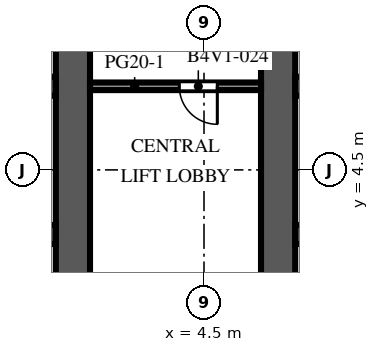
"""IFC4 building model, lengths in metres.
Left out: names, types, materials, properties, quantities, classifications, styles, units other than length and angle.
Written with IfcOpenShell. Run it as: python <this file> out.ifc"""

import sys

from ifc_helpers import new_model, si_unit, direction, frame, frame_2d, origin, place, context, subcontext, project, spatial, rectangle, extrude, element, fill, save


model = new_model("IFC4")
c1 = context("Model", 3, precision=1e-05, world=origin(), true_north=direction((0.0, 1.0)))
c2 = subcontext(c1, "Body", "Model", "MODEL_VIEW")
j1 = project(units=[si_unit("LENGTHUNIT", "METRE"), si_unit("PLANEANGLEUNIT", "RADIAN")], contexts=[c1])
p1 = place(None, origin())
s1 = spatial("IfcSite", under=j1, at=p1, CompositionType="ELEMENT")
p2 = place(p1, origin())
s2 = spatial("IfcBuilding", under=s1, at=p2, CompositionType="ELEMENT")
p3 = place(p2, frame((0.0, 0.0, 133.1)))
s3 = spatial("IfcBuildingStorey", under=s2, at=p3, CompositionType="ELEMENT", Elevation=133.1)
p4 = place(p3, frame((1.05, -9.0, 0.0), z_axis=(0.0, 0.0, 1.0), x_axis=(0.0, 1.0, 0.0)))
e1 = element("IfcWall", 1, at=p4, inside=s3, PredefinedType="SHEAR", context=c2, shape_type="SweptSolid", body=[
    extrude(rectangle(XDim=27.5, YDim=0.9, at=frame_2d((13.75, 0.0))), origin(), (0.0, 0.0, 1.0), 4.1),
])
p5 = place(p4, frame((12.55, 0.0, 0.0)))
e2 = element("IfcOpeningElement", 2, at=p5, cuts=e1, PredefinedType="OPENING", context=c2, shape_type="SweptSolid", body=[
    extrude(rectangle(XDim=2.4, YDim=2.4, at=frame_2d((1.2, 1.2))), frame((0.0, 0.46, 0.0), z_axis=(0.0, -1.0, 0.0), x_axis=(1.0, 0.0, 0.0)), (0.0, 0.0, 1.0), 0.92),
])
p6 = place(p4, frame((3.975, 0.0, 0.0)))
e3 = element("IfcOpeningElement", 3, at=p6, cuts=e1, PredefinedType="OPENING", context=c2, shape_type="SweptSolid", body=[
    extrude(rectangle(XDim=1.2, YDim=2.1, at=frame_2d((0.6, 1.05))), frame((0.0, 0.46, 0.0), z_axis=(0.0, -1.0, 0.0), x_axis=(1.0, 0.0, 0.0)), (0.0, 0.0, 1.0), 0.92),
])
p7 = place(p4, frame((22.325, 0.0, 0.0)))
e4 = element("IfcOpeningElement", 4, at=p7, cuts=e1, PredefinedType="OPENING", context=c2, shape_type="SweptSolid", body=[
    extrude(rectangle(XDim=1.2, YDim=2.1, at=frame_2d((0.6, 1.05))), frame((0.0, 0.46, 0.0), z_axis=(0.0, -1.0, 0.0), x_axis=(1.0, 0.0, 0.0)), (0.0, 0.0, 1.0), 0.92),
])
p8 = place(p3, frame((-9.6, 2.8, 0.0), z_axis=(0.0, 0.0, 1.0), x_axis=(1.0, 0.0, 0.0)))
e5 = element("IfcWall", 5, at=p8, inside=s3, PredefinedType="SHEAR", context=c2, shape_type="SweptSolid", body=[
    extrude(rectangle(XDim=10.2, YDim=0.5, at=frame_2d((5.1, 0.0))), origin(), (0.0, 0.0, 1.0), 4.1),
])
p9 = place(p8, frame((0.562, 0.0, 0.0)))
e6 = element("IfcOpeningElement", 6, at=p9, cuts=e5, PredefinedType="OPENING", context=c2, shape_type="SweptSolid", body=[
    extrude(rectangle(XDim=1.1, YDim=2.1, at=frame_2d((0.55, 1.05))), frame((0.0, 0.26, 0.0), z_axis=(0.0, -1.0, 0.0), x_axis=(1.0, 0.0, 0.0)), (0.0, 0.0, 1.0), 0.52),
])
p10 = place(p8, frame((3.238, 0.0, 0.0)))
e7 = element("IfcOpeningElement", 7, at=p10, cuts=e5, PredefinedType="OPENING", context=c2, shape_type="SweptSolid", body=[
    extrude(rectangle(XDim=1.1, YDim=2.1, at=frame_2d((0.55, 1.05))), frame((0.0, 0.26, 0.0), z_axis=(0.0, -1.0, 0.0), x_axis=(1.0, 0.0, 0.0)), (0.0, 0.0, 1.0), 0.52),
])
p11 = place(p8, frame((8.538, 0.0, 0.0)))
e8 = element("IfcOpeningElement", 8, at=p11, cuts=e5, PredefinedType="OPENING", context=c2, shape_type="SweptSolid", body=[
    extrude(rectangle(XDim=1.1, YDim=2.1, at=frame_2d((0.55, 1.05))), frame((0.0, 0.26, 0.0), z_axis=(0.0, -1.0, 0.0), x_axis=(1.0, 0.0, 0.0)), (0.0, 0.0, 1.0), 0.52),
])
p12 = place(p3, frame((-9.6, 6.7, 0.0), z_axis=(0.0, 0.0, 1.0), x_axis=(1.0, 0.0, 0.0)))
e9 = element("IfcWall", 9, at=p12, inside=s3, PredefinedType="SHEAR", context=c2, shape_type="SweptSolid", body=[
    extrude(rectangle(XDim=10.2, YDim=0.5, at=frame_2d((5.1, 0.0))), origin(), (0.0, 0.0, 1.0), 4.1),
])
p13 = place(p12, frame((0.562, 0.0, 0.0)))
e10 = element("IfcOpeningElement", 10, at=p13, cuts=e9, PredefinedType="OPENING", context=c2, shape_type="SweptSolid", body=[
    extrude(rectangle(XDim=1.1, YDim=2.1, at=frame_2d((0.55, 1.05))), frame((0.0, 0.26, 0.0), z_axis=(0.0, -1.0, 0.0), x_axis=(1.0, 0.0, 0.0)), (0.0, 0.0, 1.0), 0.52),
])
p14 = place(p12, frame((3.288, 0.0, 0.0)))
e11 = element("IfcOpeningElement", 11, at=p14, cuts=e9, PredefinedType="OPENING", context=c2, shape_type="SweptSolid", body=[
    extrude(rectangle(XDim=1.0, YDim=2.1, at=frame_2d((0.5, 1.05))), frame((0.0, 0.26, 0.0), z_axis=(0.0, -1.0, 0.0), x_axis=(1.0, 0.0, 0.0)), (0.0, 0.0, 1.0), 0.52),
])
p15 = place(p12, frame((5.913, 0.0, 0.0)))
e12 = element("IfcOpeningElement", 12, at=p15, cuts=e9, PredefinedType="OPENING", context=c2, shape_type="SweptSolid", body=[
    extrude(rectangle(XDim=1.0, YDim=2.1, at=frame_2d((0.5, 1.05))), frame((0.0, 0.26, 0.0), z_axis=(0.0, -1.0, 0.0), x_axis=(1.0, 0.0, 0.0)), (0.0, 0.0, 1.0), 0.52),
])
p16 = place(p12, frame((8.587, 0.0, 0.0)))
e13 = element("IfcOpeningElement", 13, at=p16, cuts=e9, PredefinedType="OPENING", context=c2, shape_type="SweptSolid", body=[
    extrude(rectangle(XDim=1.0, YDim=2.1, at=frame_2d((0.5, 1.05))), frame((0.0, 0.26, 0.0), z_axis=(0.0, -1.0, 0.0), x_axis=(1.0, 0.0, 0.0)), (0.0, 0.0, 1.0), 0.52),
])
p17 = place(p3, frame((6.45, -9.0, 0.0), z_axis=(0.0, 0.0, 1.0), x_axis=(0.0, 1.0, 0.0)))
e14 = element("IfcWall", 14, at=p17, inside=s3, PredefinedType="SHEAR", context=c2, shape_type="SweptSolid", body=[
    extrude(rectangle(XDim=27.5, YDim=0.9, at=frame_2d((13.75, 0.0))), origin(), (0.0, 0.0, 1.0), 4.1),
])
p18 = place(p17, frame((12.55, 0.0, 0.0)))
e15 = element("IfcOpeningElement", 15, at=p18, cuts=e14, PredefinedType="OPENING", context=c2, shape_type="SweptSolid", body=[
    extrude(rectangle(XDim=2.4, YDim=2.4, at=frame_2d((1.2, 1.2))), frame((0.0, 0.46, 0.0), z_axis=(0.0, -1.0, 0.0), x_axis=(1.0, 0.0, 0.0)), (0.0, 0.0, 1.0), 0.92),
])
p19 = place(p17, frame((3.975, 0.0, 0.0)))
e16 = element("IfcOpeningElement", 16, at=p19, cuts=e14, PredefinedType="OPENING", context=c2, shape_type="SweptSolid", body=[
    extrude(rectangle(XDim=1.2, YDim=2.1, at=frame_2d((0.6, 1.05))), frame((0.0, 0.46, 0.0), z_axis=(0.0, -1.0, 0.0), x_axis=(1.0, 0.0, 0.0)), (0.0, 0.0, 1.0), 0.92),
])
p20 = place(p17, frame((22.325, 0.0, 0.0)))
e17 = element("IfcOpeningElement", 17, at=p20, cuts=e14, PredefinedType="OPENING", context=c2, shape_type="SweptSolid", body=[
    extrude(rectangle(XDim=1.2, YDim=2.1, at=frame_2d((0.6, 1.05))), frame((0.0, 0.46, 0.0), z_axis=(0.0, -1.0, 0.0), x_axis=(1.0, 0.0, 0.0)), (0.0, 0.0, 1.0), 0.92),
])
p21 = place(p3, frame((6.9, 2.8, 0.0), z_axis=(0.0, 0.0, 1.0), x_axis=(1.0, 0.0, 0.0)))
e18 = element("IfcWall", 18, at=p21, inside=s3, PredefinedType="SHEAR", context=c2, shape_type="SweptSolid", body=[
    extrude(rectangle(XDim=10.2, YDim=0.5, at=frame_2d((5.1, 0.0))), origin(), (0.0, 0.0, 1.0), 4.1),
])
p22 = place(p21, frame((0.562, 0.0, 0.0)))
e19 = element("IfcOpeningElement", 19, at=p22, cuts=e18, PredefinedType="OPENING", context=c2, shape_type="SweptSolid", body=[
    extrude(rectangle(XDim=1.1, YDim=2.1, at=frame_2d((0.55, 1.05))), frame((0.0, 0.26, 0.0), z_axis=(0.0, -1.0, 0.0), x_axis=(1.0, 0.0, 0.0)), (0.0, 0.0, 1.0), 0.52),
])
p23 = place(p21, frame((3.238, 0.0, 0.0)))
e20 = element("IfcOpeningElement", 20, at=p23, cuts=e18, PredefinedType="OPENING", context=c2, shape_type="SweptSolid", body=[
    extrude(rectangle(XDim=1.1, YDim=2.1, at=frame_2d((0.55, 1.05))), frame((0.0, 0.26, 0.0), z_axis=(0.0, -1.0, 0.0), x_axis=(1.0, 0.0, 0.0)), (0.0, 0.0, 1.0), 0.52),
])
p24 = place(p21, frame((8.538, 0.0, 0.0)))
e21 = element("IfcOpeningElement", 21, at=p24, cuts=e18, PredefinedType="OPENING", context=c2, shape_type="SweptSolid", body=[
    extrude(rectangle(XDim=1.1, YDim=2.1, at=frame_2d((0.55, 1.05))), frame((0.0, 0.26, 0.0), z_axis=(0.0, -1.0, 0.0), x_axis=(1.0, 0.0, 0.0)), (0.0, 0.0, 1.0), 0.52),
])
p25 = place(p3, frame((6.9, 6.7, 0.0), z_axis=(0.0, 0.0, 1.0), x_axis=(1.0, 0.0, 0.0)))
e22 = element("IfcWall", 22, at=p25, inside=s3, PredefinedType="SHEAR", context=c2, shape_type="SweptSolid", body=[
    extrude(rectangle(XDim=10.2, YDim=0.5, at=frame_2d((5.1, 0.0))), origin(), (0.0, 0.0, 1.0), 4.1),
])
p26 = place(p25, frame((0.562, 0.0, 0.0)))
e23 = element("IfcOpeningElement", 23, at=p26, cuts=e22, PredefinedType="OPENING", context=c2, shape_type="SweptSolid", body=[
    extrude(rectangle(XDim=1.1, YDim=2.1, at=frame_2d((0.55, 1.05))), frame((0.0, 0.26, 0.0), z_axis=(0.0, -1.0, 0.0), x_axis=(1.0, 0.0, 0.0)), (0.0, 0.0, 1.0), 0.52),
])
p27 = place(p25, frame((3.288, 0.0, 0.0)))
e24 = element("IfcOpeningElement", 24, at=p27, cuts=e22, PredefinedType="OPENING", context=c2, shape_type="SweptSolid", body=[
    extrude(rectangle(XDim=1.0, YDim=2.1, at=frame_2d((0.5, 1.05))), frame((0.0, 0.26, 0.0), z_axis=(0.0, -1.0, 0.0), x_axis=(1.0, 0.0, 0.0)), (0.0, 0.0, 1.0), 0.52),
])
p28 = place(p25, frame((5.913, 0.0, 0.0)))
e25 = element("IfcOpeningElement", 25, at=p28, cuts=e22, PredefinedType="OPENING", context=c2, shape_type="SweptSolid", body=[
    extrude(rectangle(XDim=1.0, YDim=2.1, at=frame_2d((0.5, 1.05))), frame((0.0, 0.26, 0.0), z_axis=(0.0, -1.0, 0.0), x_axis=(1.0, 0.0, 0.0)), (0.0, 0.0, 1.0), 0.52),
])
p29 = place(p25, frame((8.587, 0.0, 0.0)))
e26 = element("IfcOpeningElement", 26, at=p29, cuts=e22, PredefinedType="OPENING", context=c2, shape_type="SweptSolid", body=[
    extrude(rectangle(XDim=1.0, YDim=2.1, at=frame_2d((0.5, 1.05))), frame((0.0, 0.26, 0.0), z_axis=(0.0, -1.0, 0.0), x_axis=(1.0, 0.0, 0.0)), (0.0, 0.0, 1.0), 0.52),
])
p30 = place(p3, frame((1.5, 6.7, 0.0), z_axis=(0.0, 0.0, 1.0), x_axis=(1.0, 0.0, 0.0)))
e27 = element("IfcWall", 27, at=p30, inside=s3, PredefinedType="PARTITIONING", context=c2, shape_type="SweptSolid", body=[
    extrude(rectangle(XDim=4.5, YDim=0.2, at=frame_2d((2.25, 0.0))), origin(), (0.0, 0.0, 1.0), 3.65),
])
p31 = place(p30, frame((2.35, 0.0, 0.0)))
e28 = element("IfcOpeningElement", 28, at=p31, cuts=e27, PredefinedType="OPENING", context=c2, shape_type="SweptSolid", body=[
    extrude(rectangle(XDim=1.0, YDim=2.1, at=frame_2d((0.5, 1.05))), frame((0.0, 0.11, 0.0), z_axis=(0.0, -1.0, 0.0), x_axis=(1.0, 0.0, 0.0)), (0.0, 0.0, 1.0), 0.22),
])
p32 = place(p5, origin())
e29 = element("IfcDoor", 29, at=p32, inside=s3, OperationType="DOUBLE_DOOR_DOUBLE_SWING", PredefinedType="DOOR", context=c2, shape_type="SweptSolid", body=[
    extrude(rectangle(XDim=2.4, YDim=2.4, at=frame_2d((1.2, 1.2))), frame((0.0, 0.025, 0.0), z_axis=(0.0, -1.0, 0.0), x_axis=(1.0, 0.0, 0.0)), (0.0, 0.0, 1.0), 0.05),
])
fill(e2, e29)
p33 = place(p18, origin())
e30 = element("IfcDoor", 30, at=p33, inside=s3, OperationType="DOUBLE_DOOR_DOUBLE_SWING", PredefinedType="DOOR", context=c2, shape_type="SweptSolid", body=[
    extrude(rectangle(XDim=2.4, YDim=2.4, at=frame_2d((1.2, 1.2))), frame((0.0, 0.025, 0.0), z_axis=(0.0, -1.0, 0.0), x_axis=(1.0, 0.0, 0.0)), (0.0, 0.0, 1.0), 0.05),
])
fill(e15, e30)
p34 = place(p31, origin())
e31 = element("IfcDoor", 31, at=p34, inside=s3, OperationType="SINGLE_SWING_RIGHT", PredefinedType="DOOR", context=c2, shape_type="SweptSolid", body=[
    extrude(rectangle(XDim=1.0, YDim=2.1, at=frame_2d((0.5, 1.05))), frame((0.0, 0.025, 0.0), z_axis=(0.0, -1.0, 0.0), x_axis=(1.0, 0.0, 0.0)), (0.0, 0.0, 1.0), 0.05),
])
fill(e28, e31)
save(model, sys.argv[1])
